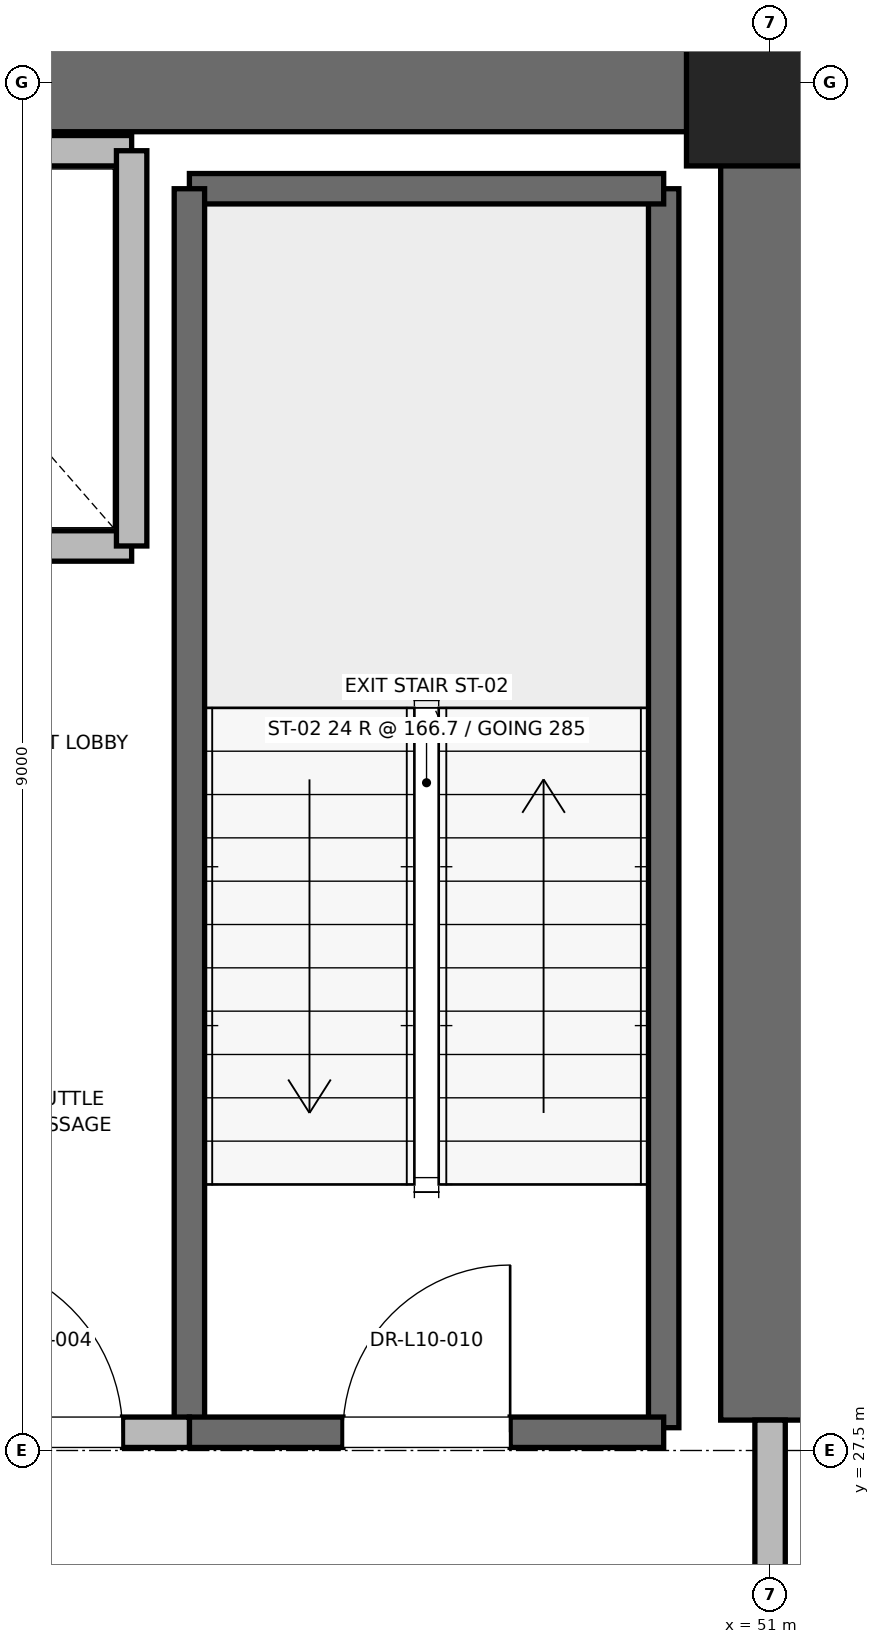
"""IFC4 building model, lengths in metres.
Left out: names, types, materials, properties, quantities, classifications, styles, units other than length and angle.
Written with IfcOpenShell. Run it as: python <this file> out.ifc"""

import sys

from ifc_helpers import new_model, si_unit, direction, frame, frame_2d, origin, origin_2d, place, context, subcontext, project, spatial, rectangle, extrude, element, fill, save


model = new_model("IFC4")
c1 = context("Model", 3, precision=1e-05, world=origin(), true_north=direction((0.0, 1.0)))
c2 = subcontext(c1, "Body", "Model", "MODEL_VIEW")
j1 = project(units=[si_unit("LENGTHUNIT", "METRE"), si_unit("PLANEANGLEUNIT", "RADIAN")], contexts=[c1])
p1 = place(None, origin())
s1 = spatial("IfcSite", under=j1, at=p1, CompositionType="ELEMENT")
p2 = place(p1, origin())
s2 = spatial("IfcBuilding", under=s1, at=p2, CompositionType="ELEMENT")
p3 = place(p2, frame((0.0, 0.0, 47.6)))
s3 = spatial("IfcBuildingStorey", under=s2, at=p3, CompositionType="ELEMENT", Elevation=47.6)
p4 = place(p3, frame((51.0, 36.5, 0.0), z_axis=(0.0, 0.0, 1.0), x_axis=(1.0, 0.0, 0.0)))
e1 = element("IfcColumn", 1, at=p4, inside=s3, PredefinedType="PILASTER", context=c2, shape_type="SweptSolid", body=[
    extrude(rectangle(XDim=1.1, YDim=1.1, at=origin_2d()), origin(), (0.0, 0.0, 1.0), 4.0),
])
p5 = place(p3, frame((45.2, 36.5, 0.0), z_axis=(0.0, 0.0, 1.0), x_axis=(1.0, 0.0, 0.0)))
e2 = element("IfcWall", 2, at=p5, inside=s3, PredefinedType="SHEAR", context=c2, shape_type="SweptSolid", body=[
    extrude(rectangle(XDim=5.8, YDim=0.65, at=frame_2d((2.9, 0.0))), origin(), (0.0, 0.0, 1.0), 3.76),
])
p6 = place(p3, frame((51.0, 27.7, 0.0), z_axis=(0.0, 0.0, 1.0), x_axis=(0.0, 1.0, 0.0)))
e3 = element("IfcWall", 3, at=p6, inside=s3, PredefinedType="SHEAR", context=c2, shape_type="SweptSolid", body=[
    extrude(rectangle(XDim=8.8, YDim=0.65, at=frame_2d((4.4, 0.0))), origin(), (0.0, 0.0, 1.0), 3.76),
])
p7 = place(p3, frame((50.3, 27.65, 0.0), z_axis=(0.0, 0.0, 1.0), x_axis=(0.0, 1.0, 0.0)))
e4 = element("IfcWall", 4, at=p7, inside=s3, PredefinedType="SOLIDWALL", context=c2, shape_type="SweptSolid", body=[
    extrude(rectangle(XDim=8.15, YDim=0.2, at=frame_2d((4.075, 0.0))), origin(), (0.0, 0.0, 1.0), 3.76),
])
p8 = place(p3, frame((47.18, 35.8, 0.0), z_axis=(0.0, 0.0, 1.0), x_axis=(1.0, 0.0, 0.0)))
e5 = element("IfcWall", 5, at=p8, inside=s3, PredefinedType="SOLIDWALL", context=c2, shape_type="SweptSolid", body=[
    extrude(rectangle(XDim=3.12, YDim=0.2, at=frame_2d((1.56, 0.0))), origin(), (0.0, 0.0, 1.0), 3.76),
])
p9 = place(p3, frame((47.18, 27.62, 0.0), z_axis=(0.0, 0.0, 1.0), x_axis=(0.0, 1.0, 0.0)))
e6 = element("IfcWall", 6, at=p9, inside=s3, PredefinedType="SOLIDWALL", context=c2, shape_type="SweptSolid", body=[
    extrude(rectangle(XDim=8.18, YDim=0.2, at=frame_2d((4.09, 0.0))), origin(), (0.0, 0.0, 1.0), 3.76),
])
p10 = place(p3, frame((47.18, 27.62, 0.0), z_axis=(0.0, 0.0, 1.0), x_axis=(1.0, 0.0, 0.0)))
e7 = element("IfcWall", 7, at=p10, inside=s3, PredefinedType="SOLIDWALL", context=c2, shape_type="SweptSolid", body=[
    extrude(rectangle(XDim=3.12, YDim=0.2, at=frame_2d((1.56, 0.0))), origin(), (0.0, 0.0, 1.0), 3.76),
])
p11 = place(p10, frame((1.01, 0.0, 0.0)))
e8 = element("IfcOpeningElement", 8, at=p11, cuts=e7, PredefinedType="OPENING", context=c2, shape_type="SweptSolid", body=[
    extrude(rectangle(XDim=1.1, YDim=2.15, at=frame_2d((0.55, 1.075))), frame((0.0, 0.1, 0.0), z_axis=(0.0, -1.0, 0.0), x_axis=(1.0, 0.0, 0.0)), (0.0, 0.0, 1.0), 0.2),
])
p12 = place(p3, frame((45.15, 27.62, 0.0), z_axis=(0.0, 0.0, 1.0), x_axis=(1.0, 0.0, 0.0)))
e9 = element("IfcWall", 9, at=p12, inside=s3, PredefinedType="PARTITIONING", context=c2, shape_type="SweptSolid", body=[
    extrude(rectangle(XDim=2.03, YDim=0.2, at=frame_2d((1.015, 0.0))), origin(), (0.0, 0.0, 1.0), 3.76),
])
p13 = place(p12, frame((0.44, 0.0, 0.0)))
e10 = element("IfcOpeningElement", 10, at=p13, cuts=e9, PredefinedType="OPENING", context=c2, shape_type="SweptSolid", body=[
    extrude(rectangle(XDim=1.15, YDim=2.2, at=frame_2d((0.575, 1.1))), frame((0.0, 0.1, 0.0), z_axis=(0.0, -1.0, 0.0), x_axis=(1.0, 0.0, 0.0)), (0.0, 0.0, 1.0), 0.2),
])
p14 = place(p3, frame((51.0, 24.3, 0.0), z_axis=(0.0, 0.0, 1.0), x_axis=(0.0, 1.0, 0.0)))
e11 = element("IfcWall", 11, at=p14, inside=s3, PredefinedType="PARTITIONING", context=c2, shape_type="SweptSolid", body=[
    extrude(rectangle(XDim=3.4, YDim=0.2, at=frame_2d((1.7, 0.0))), origin(), (0.0, 0.0, 1.0), 2.54),
])
p15 = place(p14, frame((1.125, 0.0, 0.0)))
e12 = element("IfcOpeningElement", 12, at=p15, cuts=e11, PredefinedType="OPENING", context=c2, shape_type="SweptSolid", body=[
    extrude(rectangle(XDim=1.15, YDim=2.2, at=frame_2d((0.575, 1.1))), frame((0.0, 0.1, 0.0), z_axis=(0.0, -1.0, 0.0), x_axis=(1.0, 0.0, 0.0)), (0.0, 0.0, 1.0), 0.2),
])
p16 = place(p3, frame((44.5, 33.45, 0.0), z_axis=(0.0, 0.0, 1.0), x_axis=(1.0, 0.0, 0.0)))
e13 = element("IfcWall", 13, at=p16, inside=s3, PredefinedType="SOLIDWALL", context=c2, shape_type="SweptSolid", body=[
    extrude(rectangle(XDim=2.3, YDim=0.2, at=frame_2d((1.15, 0.0))), origin(), (0.0, 0.0, 1.0), 3.76),
])
p17 = place(p3, frame((46.8, 36.05, 0.0), z_axis=(0.0, 0.0, 1.0), x_axis=(-1.0, 0.0, 0.0)))
e14 = element("IfcWall", 14, at=p17, inside=s3, PredefinedType="SOLIDWALL", context=c2, shape_type="SweptSolid", body=[
    extrude(rectangle(XDim=2.3, YDim=0.2, at=frame_2d((1.15, 0.0))), origin(), (0.0, 0.0, 1.0), 2.54),
])
p18 = place(p3, frame((46.8, 33.45, 0.0), z_axis=(0.0, 0.0, 1.0), x_axis=(0.0, 1.0, 0.0)))
e15 = element("IfcWall", 15, at=p18, inside=s3, PredefinedType="SOLIDWALL", context=c2, shape_type="SweptSolid", body=[
    extrude(rectangle(XDim=2.6, YDim=0.2, at=frame_2d((1.3, 0.0))), origin(), (0.0, 0.0, 1.0), 3.76),
])
p19 = place(p11, origin())
e16 = element("IfcDoor", 16, at=p19, inside=s3, OperationType="SINGLE_SWING_RIGHT", PredefinedType="DOOR", context=c2, shape_type="SweptSolid", body=[
    extrude(rectangle(XDim=1.1, YDim=2.15, at=frame_2d((0.55, 1.075))), frame((0.0, 0.025, 0.0), z_axis=(0.0, -1.0, 0.0), x_axis=(1.0, 0.0, 0.0)), (0.0, 0.0, 1.0), 0.05),
])
fill(e8, e16)
p20 = place(p13, origin())
e17 = element("IfcDoor", 17, at=p20, inside=s3, OperationType="SINGLE_SWING_LEFT", PredefinedType="DOOR", context=c2, shape_type="SweptSolid", body=[
    extrude(rectangle(XDim=1.15, YDim=2.2, at=frame_2d((0.575, 1.1))), frame((0.0, 0.025, 0.0), z_axis=(0.0, -1.0, 0.0), x_axis=(1.0, 0.0, 0.0)), (0.0, 0.0, 1.0), 0.05),
])
fill(e10, e17)
save(model, sys.argv[1])
